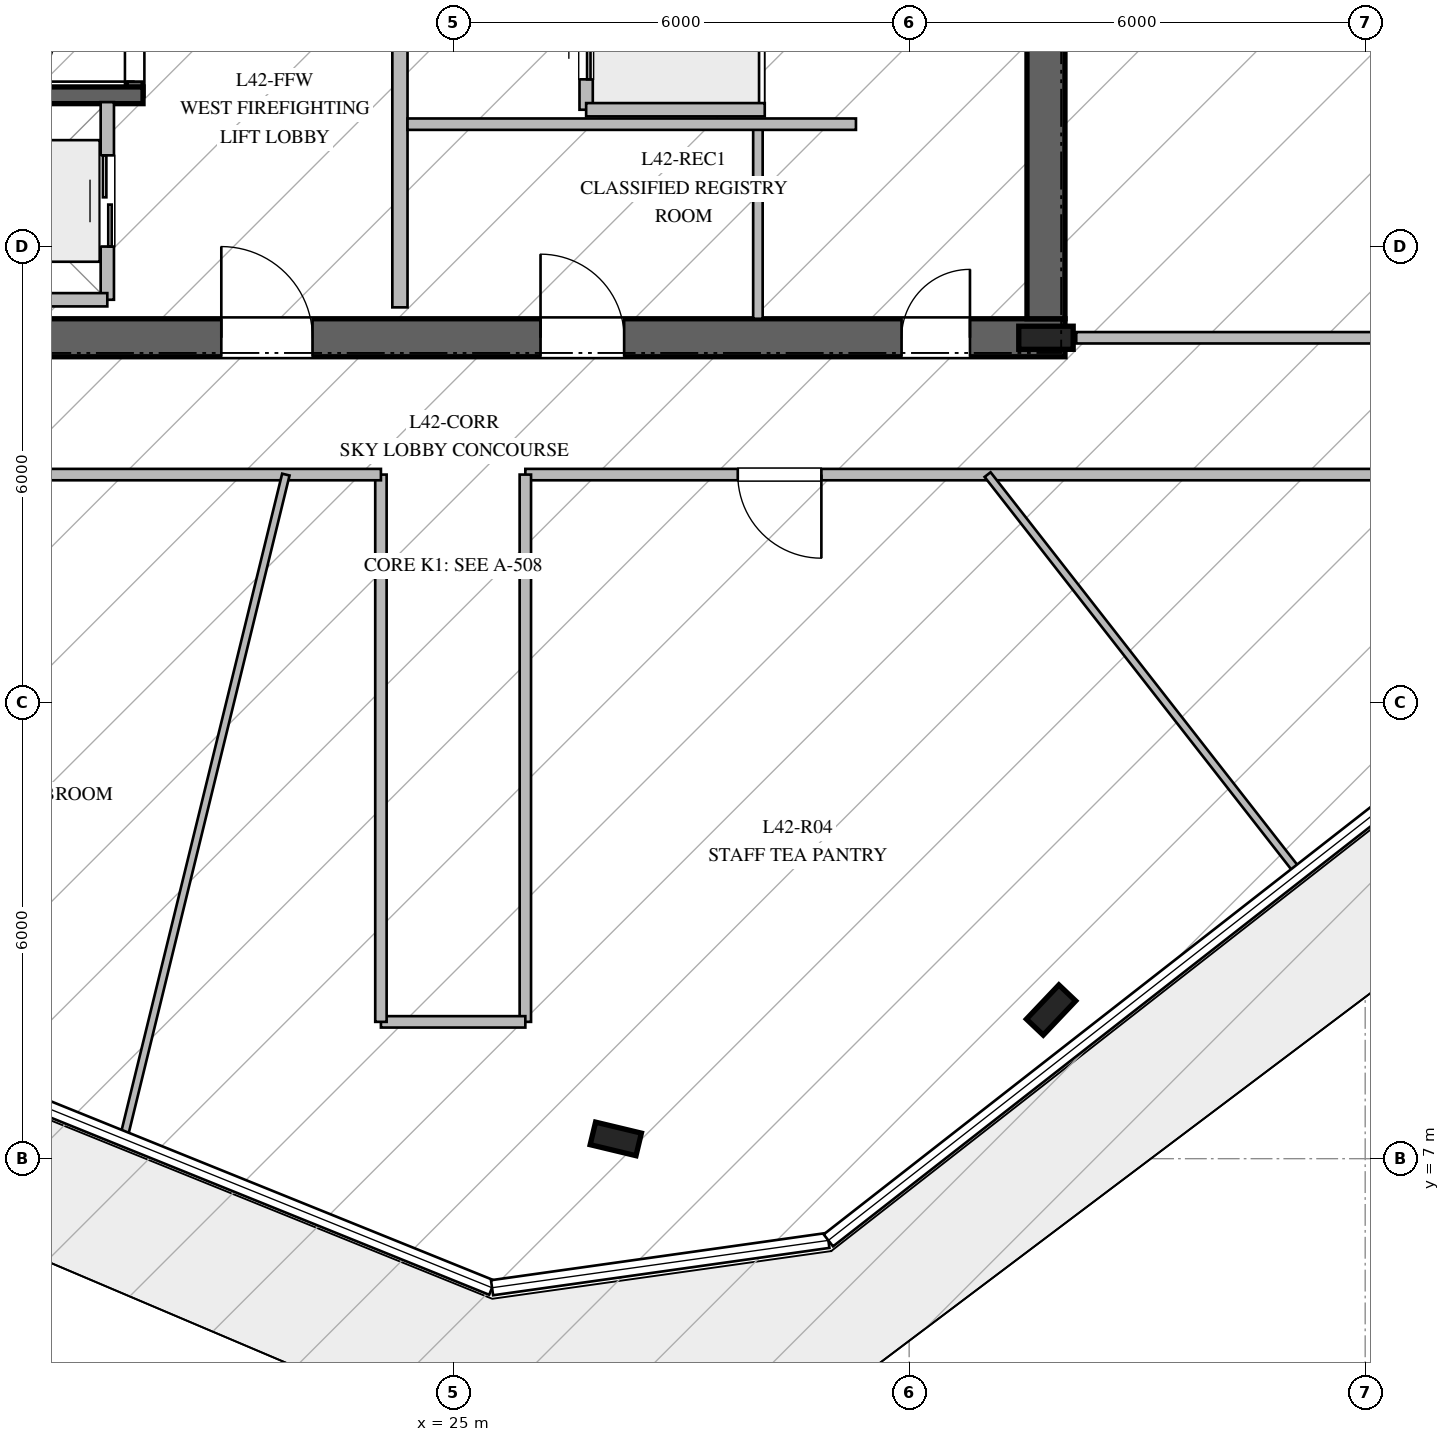
"""IFC4 building model, lengths in metres.
Left out: names, types, materials, properties, quantities, classifications, styles, units other than length and angle.
Written with IfcOpenShell. Run it as: python <this file> out.ifc"""

import sys

from ifc_helpers import new_model, si_unit, direction, frame, frame_2d, origin, origin_2d, place, context, subcontext, project, spatial, rectangle, i_section, extrude, element, fill, save


model = new_model("IFC4")
c1 = context("Model", 3, precision=1e-05, world=origin(), true_north=direction((0.0, 1.0)))
c2 = subcontext(c1, "Body", "Model", "MODEL_VIEW")
j1 = project(units=[si_unit("LENGTHUNIT", "METRE"), si_unit("PLANEANGLEUNIT", "RADIAN")], contexts=[c1])
p1 = place(None, origin())
s1 = spatial("IfcSite", under=j1, at=p1, CompositionType="ELEMENT")
p2 = place(p1, origin())
s2 = spatial("IfcBuilding", under=s1, at=p2, CompositionType="ELEMENT")
p3 = place(p2, frame((0.0, 0.0, 175.8)))
s3 = spatial("IfcBuildingStorey", under=s2, at=p3, CompositionType="ELEMENT", Elevation=175.8)
p4 = place(p3, frame((16.95, 17.8, 0.0), z_axis=(0.0, 0.0, 1.0), x_axis=(1.0, 0.0, 0.0)))
e1 = element("IfcWall", 1, at=p4, inside=s3, PredefinedType="SHEAR", context=c2, shape_type="SweptSolid", body=[
    extrude(rectangle(XDim=16.1, YDim=0.5, at=frame_2d((8.05, 0.0))), origin(), (0.0, 0.0, 1.0), 4.78),
])
p5 = place(p4, frame((5.0, 0.0, 0.0)))
e2 = element("IfcOpeningElement", 2, at=p5, cuts=e1, PredefinedType="OPENING", context=c2, shape_type="SweptSolid", body=[
    extrude(rectangle(XDim=1.2, YDim=2.25, at=frame_2d((0.6, 1.125))), frame((0.0, 0.26, 0.0), z_axis=(0.0, -1.0, 0.0), x_axis=(1.0, 0.0, 0.0)), (0.0, 0.0, 1.0), 0.52),
])
p6 = place(p4, frame((13.95, 0.0, 0.0)))
e3 = element("IfcOpeningElement", 3, at=p6, cuts=e1, PredefinedType="OPENING", context=c2, shape_type="SweptSolid", body=[
    extrude(rectangle(XDim=0.9, YDim=2.1, at=frame_2d((0.45, 1.05))), frame((0.0, 0.26, 0.0), z_axis=(0.0, -1.0, 0.0), x_axis=(1.0, 0.0, 0.0)), (0.0, 0.0, 1.0), 0.52),
])
p7 = place(p4, frame((9.2, 0.0, 0.0)))
e4 = element("IfcOpeningElement", 4, at=p7, cuts=e1, PredefinedType="OPENING", context=c2, shape_type="SweptSolid", body=[
    extrude(rectangle(XDim=1.1, YDim=2.2, at=frame_2d((0.55, 1.1))), frame((0.0, 0.26, 0.0), z_axis=(0.0, -1.0, 0.0), x_axis=(1.0, 0.0, 0.0)), (0.0, 0.0, 1.0), 0.52),
])
p8 = place(p3, frame((32.8, 18.05, 0.0), z_axis=(0.0, 0.0, 1.0), x_axis=(0.0, 1.0, 0.0)))
e5 = element("IfcWall", 5, at=p8, inside=s3, PredefinedType="SHEAR", context=c2, shape_type="SweptSolid", body=[
    extrude(rectangle(XDim=13.9, YDim=0.5, at=frame_2d((6.95, 0.0))), origin(), (0.0, 0.0, 1.0), 4.78),
])
p9 = place(p3, frame((32.8, 17.8, 0.0), z_axis=(0.0, 0.0, 1.0), x_axis=(1.0, 0.0, 0.0)))
e6 = element("IfcColumn", 6, at=p9, inside=s3, PredefinedType="COLUMN", context=c2, shape_type="SweptSolid", body=[
    extrude(i_section(OverallWidth=0.304, OverallDepth=0.716, WebThickness=0.021, FlangeThickness=0.04, at=origin_2d()), origin(), (0.0, 0.0, 1.0), 5.0),
])
p10 = place(p3, frame((20.81, 20.99, 0.0), z_axis=(0.0, 0.0, 1.0), x_axis=(0.0, 1.0, 0.0)))
e7 = element("IfcWall", 7, at=p10, inside=s3, PredefinedType="SOLIDWALL", context=c2, shape_type="SweptSolid", body=[
    extrude(rectangle(XDim=7.22, YDim=0.22, at=frame_2d((3.61, 0.0))), origin(), (0.0, 0.0, 1.0), 4.78),
])
p11 = place(p10, frame((0.18, 0.0, 0.0)))
e8 = element("IfcOpeningElement", 8, at=p11, cuts=e7, PredefinedType="OPENING", context=c2, shape_type="SweptSolid", body=[
    extrude(rectangle(XDim=1.15, YDim=2.2, at=frame_2d((0.575, 1.1))), frame((0.0, 0.12, 0.0), z_axis=(0.0, -1.0, 0.0), x_axis=(1.0, 0.0, 0.0)), (0.0, 0.0, 1.0), 0.24),
])
p12 = place(p3, frame((17.2, 20.99, 0.0), z_axis=(0.0, 0.0, 1.0), x_axis=(1.0, 0.0, 0.0)))
e9 = element("IfcWall", 9, at=p12, inside=s3, PredefinedType="SOLIDWALL", context=c2, shape_type="SweptSolid", body=[
    extrude(rectangle(XDim=3.72, YDim=0.22, at=frame_2d((1.86, 0.0))), origin(), (0.0, 0.0, 1.0), 4.78),
])
for number, where, z_axis, x_axis in (
    (10, (27.14, 7.26, -0.27), (0.0, 0.0, 1.0), (-0.972, 0.233, 0.0)),
    (11, (32.867, 8.956, -0.27), (0.0, 0.0, 1.0), (0.688, 0.725, 0.0)),
):
    element("IfcColumn", number, at=place(p3, frame(where, z_axis=z_axis, x_axis=x_axis)), inside=s3, PredefinedType="COLUMN", context=c2, shape_type="SweptSolid", body=[
        extrude(i_section(OverallWidth=0.305, OverallDepth=0.62, WebThickness=0.021, FlangeThickness=0.04, at=origin_2d()), origin(), (0.0, 0.0, 1.0), 5.27),
    ])
p13 = place(p3, frame((24.3, 18.2, 0.0), z_axis=(0.0, 0.0, 1.0), x_axis=(0.0, 1.0, 0.0)))
e12 = element("IfcWall", 12, at=p13, inside=s3, PredefinedType="PARTITIONING", context=c2, shape_type="SweptSolid", body=[
    extrude(rectangle(XDim=5.15, YDim=0.2, at=frame_2d((2.575, 0.0))), origin(), (0.0, 0.0, 1.0), 4.78),
])
p14 = place(p3, frame((29.01, 18.05, 0.0), z_axis=(0.0, 0.0, 1.0), x_axis=(0.0, 1.0, 0.0)))
e13 = element("IfcWall", 13, at=p14, inside=s3, PredefinedType="PARTITIONING", context=c2, shape_type="SweptSolid", body=[
    extrude(rectangle(XDim=2.5, YDim=0.125, at=frame_2d((1.25, 0.0))), origin(), (0.0, 0.0, 1.0), 4.78),
])
p15 = place(p3, frame((24.4, 20.61, 0.0), z_axis=(0.0, 0.0, 1.0), x_axis=(1.0, 0.0, 0.0)))
e14 = element("IfcWall", 14, at=p15, inside=s3, PredefinedType="PARTITIONING", context=c2, shape_type="SweptSolid", body=[
    extrude(rectangle(XDim=5.9, YDim=0.15, at=frame_2d((2.95, 0.0))), origin(), (0.0, 0.0, 1.0), 4.78),
])
p16 = place(p3, frame((26.75, 20.8, 0.0), z_axis=(0.0, 0.0, 1.0), x_axis=(0.0, 1.0, 0.0)))
e15 = element("IfcWall", 15, at=p16, inside=s3, PredefinedType="PARTITIONING", context=c2, shape_type="SweptSolid", body=[
    extrude(rectangle(XDim=1.9, YDim=0.175, at=frame_2d((0.95, 0.0))), origin(), (0.0, 0.0, 1.0), 4.78),
])
p17 = place(p16, frame((0.4, 0.0, 0.0)))
e16 = element("IfcOpeningElement", 16, at=p17, cuts=e15, PredefinedType="OPENING", context=c2, shape_type="SweptSolid", body=[
    extrude(rectangle(XDim=1.1, YDim=2.2, at=frame_2d((0.55, 1.1))), frame((0.0, 0.098, 0.0), z_axis=(0.0, -1.0, 0.0), x_axis=(1.0, 0.0, 0.0)), (0.0, 0.0, 1.0), 0.195),
])
p18 = place(p3, frame((26.75, 20.8, 0.0), z_axis=(0.0, 0.0, 1.0), x_axis=(1.0, 0.0, 0.0)))
e17 = element("IfcWall", 17, at=p18, inside=s3, PredefinedType="PARTITIONING", context=c2, shape_type="SweptSolid", body=[
    extrude(rectangle(XDim=2.35, YDim=0.175, at=frame_2d((1.175, 0.0))), origin(), (0.0, 0.0, 1.0), 4.78),
])
p19 = place(p3, frame((20.45, 18.3, 0.0), z_axis=(0.0, 0.0, 1.0), x_axis=(0.0, 1.0, 0.0)))
e18 = element("IfcWall", 18, at=p19, inside=s3, PredefinedType="PARTITIONING", context=c2, shape_type="SweptSolid", body=[
    extrude(rectangle(XDim=2.6, YDim=0.175, at=frame_2d((1.3, 0.0))), origin(), (0.0, 0.0, 1.0), 4.78),
])
p20 = place(p19, frame((0.7, 0.0, 0.0)))
e19 = element("IfcOpeningElement", 19, at=p20, cuts=e18, PredefinedType="OPENING", context=c2, shape_type="SweptSolid", body=[
    extrude(rectangle(XDim=1.2, YDim=2.2, at=frame_2d((0.6, 1.1))), frame((0.0, 0.098, 0.0), z_axis=(0.0, -1.0, 0.0), x_axis=(1.0, 0.0, 0.0)), (0.0, 0.0, 1.0), 0.195),
])
p21 = place(p3, frame((17.85, 18.3, 0.0), z_axis=(0.0, 0.0, 1.0), x_axis=(1.0, 0.0, 0.0)))
e20 = element("IfcWall", 20, at=p21, inside=s3, PredefinedType="PARTITIONING", context=c2, shape_type="SweptSolid", body=[
    extrude(rectangle(XDim=2.6, YDim=0.175, at=frame_2d((1.3, 0.0))), origin(), (0.0, 0.0, 1.0), 4.78),
])
p22 = place(p3, frame((33.198, 17.8, 0.0), z_axis=(0.0, 0.0, 1.0), x_axis=(1.0, 0.0, 0.0)))
e21 = element("IfcWall", 21, at=p22, inside=s3, PredefinedType="PARTITIONING", context=c2, shape_type="SweptSolid", body=[
    extrude(rectangle(XDim=7.467, YDim=0.15, at=frame_2d((3.733, 0.0))), origin(), (0.0, 0.0, 1.0), 4.28),
])
p23 = place(p3, frame((38.989, 16.0, 0.0), z_axis=(0.0, 0.0, 1.0), x_axis=(-1.0, 0.0, 0.0)))
e22 = element("IfcWall", 22, at=p23, inside=s3, PredefinedType="PARTITIONING", context=c2, shape_type="SweptSolid", body=[
    extrude(rectangle(XDim=13.039, YDim=0.15, at=frame_2d((6.52, 0.0))), origin(), (0.0, 0.0, 1.0), 4.28),
])
p24 = place(p23, frame((9.144, 0.0, 0.0)))
e23 = element("IfcOpeningElement", 23, at=p24, cuts=e22, PredefinedType="OPENING", context=c2, shape_type="SweptSolid", body=[
    extrude(rectangle(XDim=1.1, YDim=2.2, at=frame_2d((0.55, 1.1))), frame((0.0, 0.085, 0.0), z_axis=(0.0, -1.0, 0.0), x_axis=(1.0, 0.0, 0.0)), (0.0, 0.0, 1.0), 0.17),
])
p25 = place(p3, frame((25.95, 16.0, 0.0), z_axis=(0.0, 0.0, 1.0), x_axis=(0.0, -1.0, 0.0)))
e24 = element("IfcWall", 24, at=p25, inside=s3, PredefinedType="PARTITIONING", context=c2, shape_type="SweptSolid", body=[
    extrude(rectangle(XDim=7.2, YDim=0.15, at=frame_2d((3.6, 0.0))), origin(), (0.0, 0.0, 1.0), 4.05),
])
p26 = place(p3, frame((25.95, 8.8, 0.0), z_axis=(0.0, 0.0, 1.0), x_axis=(-1.0, 0.0, 0.0)))
e25 = element("IfcWall", 25, at=p26, inside=s3, PredefinedType="PARTITIONING", context=c2, shape_type="SweptSolid", body=[
    extrude(rectangle(XDim=1.9, YDim=0.15, at=frame_2d((0.95, 0.0))), origin(), (0.0, 0.0, 1.0), 4.78),
])
p27 = place(p3, frame((24.05, 8.8, 0.0), z_axis=(0.0, 0.0, 1.0), x_axis=(0.0, 1.0, 0.0)))
e26 = element("IfcWall", 26, at=p27, inside=s3, PredefinedType="PARTITIONING", context=c2, shape_type="SweptSolid", body=[
    extrude(rectangle(XDim=7.2, YDim=0.15, at=frame_2d((3.6, 0.0))), origin(), (0.0, 0.0, 1.0), 4.05),
])
p28 = place(p3, frame((24.05, 16.0, 0.0), z_axis=(0.0, 0.0, 1.0), x_axis=(-1.0, 0.0, 0.0)))
e27 = element("IfcWall", 27, at=p28, inside=s3, PredefinedType="PARTITIONING", context=c2, shape_type="SweptSolid", body=[
    extrude(rectangle(XDim=6.85, YDim=0.15, at=frame_2d((3.425, 0.0))), origin(), (0.0, 0.0, 1.0), 4.78),
])
p29 = place(p3, frame((22.799, 16.0, 0.0), z_axis=(0.0, 0.0, 1.0), x_axis=(-0.237561419307, -0.971372519715, 0.0)))
e28 = element("IfcWall", 28, at=p29, inside=s3, PredefinedType="MOVABLE", context=c2, shape_type="SweptSolid", body=[
    extrude(rectangle(XDim=8.979, YDim=0.1, at=frame_2d((4.49, 0.0))), origin(), (0.0, 0.0, 1.0), 4.05),
])
p30 = place(p3, frame((32.032, 16.0, 0.0), z_axis=(0.0, 0.0, 1.0), x_axis=(0.615676896023, -0.787998705395, 0.0)))
e29 = element("IfcWall", 29, at=p30, inside=s3, PredefinedType="MOVABLE", context=c2, shape_type="SweptSolid", body=[
    extrude(rectangle(XDim=6.633, YDim=0.1, at=frame_2d((3.317, 0.0))), origin(), (0.0, 0.0, 1.0), 4.18),
])
p31 = place(p11, origin())
e30 = element("IfcDoor", 30, at=p31, inside=s3, OperationType="SINGLE_SWING_LEFT", PredefinedType="DOOR", context=c2, shape_type="SweptSolid", body=[
    extrude(rectangle(XDim=1.15, YDim=2.2, at=frame_2d((0.575, 1.1))), frame((0.0, 0.025, 0.0), z_axis=(0.0, -1.0, 0.0), x_axis=(1.0, 0.0, 0.0)), (0.0, 0.0, 1.0), 0.05),
])
fill(e8, e30)
p32 = place(p5, origin())
e31 = element("IfcDoor", 31, at=p32, inside=s3, OperationType="SINGLE_SWING_LEFT", PredefinedType="DOOR", context=c2, shape_type="SweptSolid", body=[
    extrude(rectangle(XDim=1.2, YDim=2.25, at=frame_2d((0.6, 1.125))), frame((0.0, 0.025, 0.0), z_axis=(0.0, -1.0, 0.0), x_axis=(1.0, 0.0, 0.0)), (0.0, 0.0, 1.0), 0.05),
])
fill(e2, e31)
p33 = place(p6, origin())
e32 = element("IfcDoor", 32, at=p33, inside=s3, OperationType="SINGLE_SWING_RIGHT", PredefinedType="DOOR", context=c2, shape_type="SweptSolid", body=[
    extrude(rectangle(XDim=0.9, YDim=2.1, at=frame_2d((0.45, 1.05))), frame((0.0, 0.025, 0.0), z_axis=(0.0, -1.0, 0.0), x_axis=(1.0, 0.0, 0.0)), (0.0, 0.0, 1.0), 0.05),
])
fill(e3, e32)
p34 = place(p7, origin())
e33 = element("IfcDoor", 33, at=p34, inside=s3, OperationType="SINGLE_SWING_LEFT", PredefinedType="DOOR", context=c2, shape_type="SweptSolid", body=[
    extrude(rectangle(XDim=1.1, YDim=2.2, at=frame_2d((0.55, 1.1))), frame((0.0, 0.025, 0.0), z_axis=(0.0, -1.0, 0.0), x_axis=(1.0, 0.0, 0.0)), (0.0, 0.0, 1.0), 0.05),
])
fill(e4, e33)
p35 = place(p17, origin())
e34 = element("IfcDoor", 34, at=p35, inside=s3, OperationType="DOUBLE_DOOR_SLIDING", PredefinedType="DOOR", context=c2, shape_type="SweptSolid", body=[
    extrude(rectangle(XDim=1.1, YDim=2.2, at=frame_2d((0.55, 1.1))), frame((0.0, 0.025, 0.0), z_axis=(0.0, -1.0, 0.0), x_axis=(1.0, 0.0, 0.0)), (0.0, 0.0, 1.0), 0.05),
])
fill(e16, e34)
p36 = place(p20, origin())
e35 = element("IfcDoor", 35, at=p36, inside=s3, OperationType="DOUBLE_DOOR_SLIDING", PredefinedType="DOOR", context=c2, shape_type="SweptSolid", body=[
    extrude(rectangle(XDim=1.2, YDim=2.2, at=frame_2d((0.6, 1.1))), frame((0.0, 0.025, 0.0), z_axis=(0.0, -1.0, 0.0), x_axis=(1.0, 0.0, 0.0)), (0.0, 0.0, 1.0), 0.05),
])
fill(e19, e35)
p37 = place(p24, origin())
e36 = element("IfcDoor", 36, at=p37, inside=s3, OperationType="SINGLE_SWING_LEFT", PredefinedType="DOOR", context=c2, shape_type="SweptSolid", body=[
    extrude(rectangle(XDim=1.1, YDim=2.2, at=frame_2d((0.55, 1.1))), frame((0.0, 0.025, 0.0), z_axis=(0.0, -1.0, 0.0), x_axis=(1.0, 0.0, 0.0)), (0.0, 0.0, 1.0), 0.05),
])
fill(e23, e36)
save(model, sys.argv[1])
